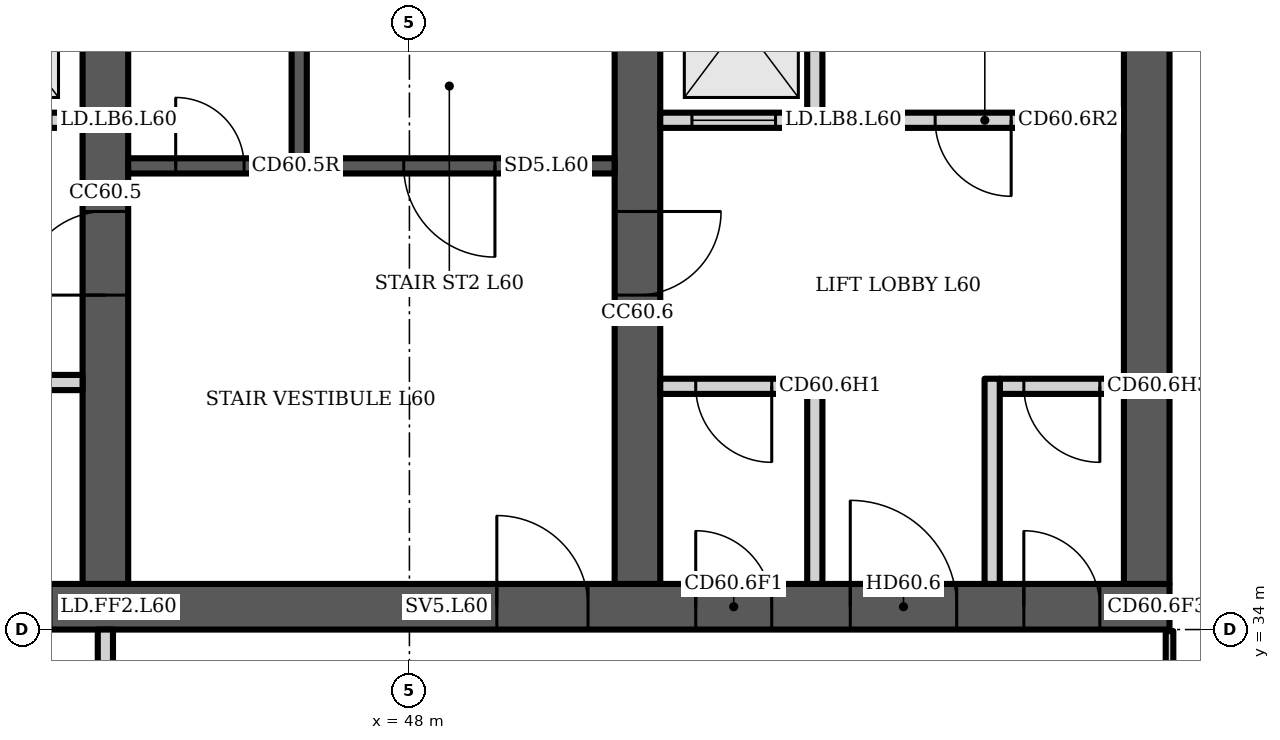
"""IFC4 building model, lengths in metres.
Left out: names, types, materials, properties, quantities, classifications, styles, units other than length and angle.
Written with IfcOpenShell. Run it as: python <this file> out.ifc"""

import sys

from ifc_helpers import new_model, si_unit, direction, frame, frame_2d, origin, place, context, subcontext, project, spatial, polyline, rectangle, outline, extrude, element, fill, save


model = new_model("IFC4")
c1 = context("Model", 3, precision=1e-05, world=origin(), true_north=direction((0.0, 1.0)))
c2 = subcontext(c1, "Body", "Model", "MODEL_VIEW")
j1 = project(units=[si_unit("LENGTHUNIT", "METRE"), si_unit("PLANEANGLEUNIT", "RADIAN")], contexts=[c1])
p1 = place(None, origin())
s1 = spatial("IfcSite", under=j1, at=p1, CompositionType="ELEMENT")
p2 = place(p1, origin())
s2 = spatial("IfcBuilding", under=s1, at=p2, CompositionType="ELEMENT")
p3 = place(p2, frame((0.0, 0.0, 239.5)))
s3 = spatial("IfcBuildingStorey", under=s2, at=p3, CompositionType="ELEMENT", Elevation=239.5)
p4 = place(p3, frame((23.0, 34.3, 0.0), z_axis=(0.0, 0.0, 1.0), x_axis=(1.0, 0.0, 0.0)))
e1 = element("IfcWall", 1, at=p4, inside=s3, PredefinedType="SHEAR", context=c2, shape_type="SweptSolid", body=[
    extrude(rectangle(XDim=35.0, YDim=0.6, at=frame_2d((17.5, 0.0))), origin(), (0.0, 0.0, 1.0), 3.6),
])
p5 = place(p4, frame((0.65, 0.0, 0.0)))
e2 = element("IfcOpeningElement", 2, at=p5, cuts=e1, PredefinedType="OPENING", context=c2, shape_type="SweptSolid", body=[
    extrude(rectangle(XDim=1.2, YDim=2.1, at=frame_2d((0.6, 1.05))), frame((0.0, 0.31, 0.0), z_axis=(0.0, -1.0, 0.0), x_axis=(1.0, 0.0, 0.0)), (0.0, 0.0, 1.0), 0.62),
])
p6 = place(p4, frame((7.717, 0.0, 0.0)))
e3 = element("IfcOpeningElement", 3, at=p6, cuts=e1, PredefinedType="OPENING", context=c2, shape_type="SweptSolid", body=[
    extrude(rectangle(XDim=1.1, YDim=2.1, at=frame_2d((0.55, 1.05))), frame((0.0, 0.31, 0.0), z_axis=(0.0, -1.0, 0.0), x_axis=(1.0, 0.0, 0.0)), (0.0, 0.0, 1.0), 0.62),
])
p7 = place(p4, frame((12.183, 0.0, 0.0)))
e4 = element("IfcOpeningElement", 4, at=p7, cuts=e1, PredefinedType="OPENING", context=c2, shape_type="SweptSolid", body=[
    extrude(rectangle(XDim=1.1, YDim=2.1, at=frame_2d((0.55, 1.05))), frame((0.0, 0.31, 0.0), z_axis=(0.0, -1.0, 0.0), x_axis=(1.0, 0.0, 0.0)), (0.0, 0.0, 1.0), 0.62),
])
p8 = place(p4, frame((9.8, 0.0, 0.0)))
e5 = element("IfcOpeningElement", 5, at=p8, cuts=e1, PredefinedType="OPENING", context=c2, shape_type="SweptSolid", body=[
    extrude(rectangle(XDim=1.4, YDim=2.1, at=frame_2d((0.7, 1.05))), frame((0.0, 0.31, 0.0), z_axis=(0.0, -1.0, 0.0), x_axis=(1.0, 0.0, 0.0)), (0.0, 0.0, 1.0), 0.62),
])
p9 = place(p4, frame((14.717, 0.0, 0.0)))
e6 = element("IfcOpeningElement", 6, at=p9, cuts=e1, PredefinedType="OPENING", context=c2, shape_type="SweptSolid", body=[
    extrude(rectangle(XDim=1.1, YDim=2.1, at=frame_2d((0.55, 1.05))), frame((0.0, 0.31, 0.0), z_axis=(0.0, -1.0, 0.0), x_axis=(1.0, 0.0, 0.0)), (0.0, 0.0, 1.0), 0.62),
])
p10 = place(p4, frame((16.95, 0.0, 0.0)))
e7 = element("IfcOpeningElement", 7, at=p10, cuts=e1, PredefinedType="OPENING", context=c2, shape_type="SweptSolid", body=[
    extrude(rectangle(XDim=1.1, YDim=2.1, at=frame_2d((0.55, 1.05))), frame((0.0, 0.31, 0.0), z_axis=(0.0, -1.0, 0.0), x_axis=(1.0, 0.0, 0.0)), (0.0, 0.0, 1.0), 0.62),
])
p11 = place(p4, frame((19.183, 0.0, 0.0)))
e8 = element("IfcOpeningElement", 8, at=p11, cuts=e1, PredefinedType="OPENING", context=c2, shape_type="SweptSolid", body=[
    extrude(rectangle(XDim=1.1, YDim=2.1, at=frame_2d((0.55, 1.05))), frame((0.0, 0.31, 0.0), z_axis=(0.0, -1.0, 0.0), x_axis=(1.0, 0.0, 0.0)), (0.0, 0.0, 1.0), 0.62),
])
p12 = place(p4, frame((26.15, 0.0, 0.0)))
e9 = element("IfcOpeningElement", 9, at=p12, cuts=e1, PredefinedType="OPENING", context=c2, shape_type="SweptSolid", body=[
    extrude(rectangle(XDim=1.2, YDim=2.1, at=frame_2d((0.6, 1.05))), frame((0.0, 0.31, 0.0), z_axis=(0.0, -1.0, 0.0), x_axis=(1.0, 0.0, 0.0)), (0.0, 0.0, 1.0), 0.62),
])
p13 = place(p4, frame((28.767, 0.0, 0.0)))
e10 = element("IfcOpeningElement", 10, at=p13, cuts=e1, PredefinedType="OPENING", context=c2, shape_type="SweptSolid", body=[
    extrude(rectangle(XDim=1.0, YDim=2.1, at=frame_2d((0.5, 1.05))), frame((0.0, 0.31, 0.0), z_axis=(0.0, -1.0, 0.0), x_axis=(1.0, 0.0, 0.0)), (0.0, 0.0, 1.0), 0.62),
])
p14 = place(p4, frame((33.083, 0.0, 0.0)))
e11 = element("IfcOpeningElement", 11, at=p14, cuts=e1, PredefinedType="OPENING", context=c2, shape_type="SweptSolid", body=[
    extrude(rectangle(XDim=1.0, YDim=2.1, at=frame_2d((0.5, 1.05))), frame((0.0, 0.31, 0.0), z_axis=(0.0, -1.0, 0.0), x_axis=(1.0, 0.0, 0.0)), (0.0, 0.0, 1.0), 0.62),
])
p15 = place(p4, frame((30.8, 0.0, 0.0)))
e12 = element("IfcOpeningElement", 12, at=p15, cuts=e1, PredefinedType="OPENING", context=c2, shape_type="SweptSolid", body=[
    extrude(rectangle(XDim=1.4, YDim=2.1, at=frame_2d((0.7, 1.05))), frame((0.0, 0.31, 0.0), z_axis=(0.0, -1.0, 0.0), x_axis=(1.0, 0.0, 0.0)), (0.0, 0.0, 1.0), 0.62),
])
p16 = place(p3, frame((44.0, 34.6, 0.0), z_axis=(0.0, 0.0, 1.0), x_axis=(0.0, 1.0, 0.0)))
e13 = element("IfcWall", 13, at=p16, inside=s3, PredefinedType="SHEAR", context=c2, shape_type="SweptSolid", body=[
    extrude(rectangle(XDim=14.784, YDim=0.6, at=frame_2d((7.392, 0.0))), origin(), (0.0, 0.0, 1.0), 3.6),
])
p17 = place(p16, frame((11.608, 0.0, 0.0)))
e14 = element("IfcOpeningElement", 14, at=p17, cuts=e13, PredefinedType="OPENING", context=c2, shape_type="SweptSolid", body=[
    extrude(rectangle(XDim=1.0, YDim=2.1, at=frame_2d((0.5, 1.05))), frame((0.0, 0.31, 0.0), z_axis=(0.0, -1.0, 0.0), x_axis=(1.0, 0.0, 0.0)), (0.0, 0.0, 1.0), 0.62),
])
p18 = place(p16, frame((3.8, 0.0, 0.0)))
e15 = element("IfcOpeningElement", 15, at=p18, cuts=e13, PredefinedType="OPENING", context=c2, shape_type="SweptSolid", body=[
    extrude(rectangle(XDim=1.1, YDim=2.1, at=frame_2d((0.55, 1.05))), frame((0.0, 0.31, 0.0), z_axis=(0.0, -1.0, 0.0), x_axis=(1.0, 0.0, 0.0)), (0.0, 0.0, 1.0), 0.62),
])
p19 = place(p3, frame((51.0, 34.6, 0.0), z_axis=(0.0, 0.0, 1.0), x_axis=(0.0, 1.0, 0.0)))
e16 = element("IfcWall", 16, at=p19, inside=s3, PredefinedType="SHEAR", context=c2, shape_type="SweptSolid", body=[
    extrude(rectangle(XDim=14.171, YDim=0.6, at=frame_2d((7.085, 0.0))), origin(), (0.0, 0.0, 1.0), 3.6),
])
p20 = place(p19, frame((3.8, 0.0, 0.0)))
e17 = element("IfcOpeningElement", 17, at=p20, cuts=e16, PredefinedType="OPENING", context=c2, shape_type="SweptSolid", body=[
    extrude(rectangle(XDim=1.1, YDim=2.1, at=frame_2d((0.55, 1.05))), frame((0.0, 0.31, 0.0), z_axis=(0.0, -1.0, 0.0), x_axis=(1.0, 0.0, 0.0)), (0.0, 0.0, 1.0), 0.62),
])
p21 = place(p3, frame((57.7, 34.6, 0.0), z_axis=(0.0, 0.0, 1.0), x_axis=(0.0, 1.0, 0.0)))
e18 = element("IfcWall", 18, at=p21, inside=s3, PredefinedType="SHEAR", context=c2, shape_type="SweptSolid", body=[
    extrude(rectangle(XDim=13.585, YDim=0.6, at=frame_2d((6.792, 0.0))), origin(), (0.0, 0.0, 1.0), 3.6),
])
p22 = place(p3, frame((37.3, 40.7, 0.0), z_axis=(0.0, 0.0, 1.0), x_axis=(1.0, 0.0, 0.0)))
e19 = element("IfcWall", 19, at=p22, inside=s3, PredefinedType="PARTITIONING", context=c2, shape_type="SweptSolid", body=[
    extrude(rectangle(XDim=6.4, YDim=0.2, at=frame_2d((3.2, 0.0))), origin(), (0.0, 0.0, 1.0), 3.2),
])
p23 = place(p22, frame((0.417, 0.0, 0.0)))
e20 = element("IfcOpeningElement", 20, at=p23, cuts=e19, PredefinedType="OPENING", context=c2, shape_type="SweptSolid", body=[
    extrude(rectangle(XDim=1.1, YDim=2.1, at=frame_2d((0.55, 1.05))), frame((0.0, 0.11, 0.0), z_axis=(0.0, -1.0, 0.0), x_axis=(1.0, 0.0, 0.0)), (0.0, 0.0, 1.0), 0.22),
])
p24 = place(p22, frame((2.65, 0.0, 0.0)))
e21 = element("IfcOpeningElement", 21, at=p24, cuts=e19, PredefinedType="OPENING", context=c2, shape_type="SweptSolid", body=[
    extrude(rectangle(XDim=1.1, YDim=2.1, at=frame_2d((0.55, 1.05))), frame((0.0, 0.11, 0.0), z_axis=(0.0, -1.0, 0.0), x_axis=(1.0, 0.0, 0.0)), (0.0, 0.0, 1.0), 0.22),
])
p25 = place(p22, frame((4.883, 0.0, 0.0)))
e22 = element("IfcOpeningElement", 22, at=p25, cuts=e19, PredefinedType="OPENING", context=c2, shape_type="SweptSolid", body=[
    extrude(rectangle(XDim=1.1, YDim=2.1, at=frame_2d((0.55, 1.05))), frame((0.0, 0.11, 0.0), z_axis=(0.0, -1.0, 0.0), x_axis=(1.0, 0.0, 0.0)), (0.0, 0.0, 1.0), 0.22),
])
p26 = place(p3, frame((0.0, 0.0, -0.0)))
e23 = element("IfcWall", 23, at=p26, inside=s3, PredefinedType="PARTITIONING", context=c2, shape_type="SweptSolid", body=[
    extrude(outline(polyline([(41.567, 37.1), (39.433, 37.1), (39.433, 34.6), (39.233, 34.6), (39.233, 37.45), (37.3, 37.45), (37.3, 37.65), (39.233, 37.65), (39.433, 37.65), (39.433, 37.3), (41.567, 37.3), (41.567, 37.35), (41.767, 37.35), (43.7, 37.35), (43.7, 37.15), (41.767, 37.15), (41.767, 34.6), (41.567, 34.6), (41.567, 37.1)])), origin(), (0.0, 0.0, 1.0), 3.2),
])
p27 = place(p3, frame((0.0, 0.0, -0.0)))
e24 = element("IfcWall", 24, at=p27, inside=s3, PredefinedType="PARTITIONING", context=c2, shape_type="SweptSolid", body=[
    extrude(outline(polyline([(39.433, 40.8), (39.233, 40.8), (39.233, 43.8), (37.3, 43.8), (37.3, 44.0), (43.7, 44.0), (43.7, 43.8), (41.767, 43.8), (41.767, 40.8), (41.567, 40.8), (41.567, 43.8), (39.433, 43.8), (39.433, 40.8)])), origin(), (0.0, 0.0, 1.0), 3.2),
])
p28 = place(p3, frame((44.3, 40.1, 0.0), z_axis=(0.0, 0.0, 1.0), x_axis=(1.0, 0.0, 0.0)))
e25 = element("IfcWall", 25, at=p28, inside=s3, PredefinedType="SHEAR", context=c2, shape_type="SweptSolid", body=[
    extrude(rectangle(XDim=6.4, YDim=0.2, at=frame_2d((3.2, 0.0))), origin(), (0.0, 0.0, 1.0), 3.2),
])
p29 = place(p28, frame((3.625, 0.0, 0.0)))
e26 = element("IfcOpeningElement", 26, at=p29, cuts=e25, PredefinedType="OPENING", context=c2, shape_type="SweptSolid", body=[
    extrude(rectangle(XDim=1.2, YDim=2.1, at=frame_2d((0.6, 1.05))), frame((0.0, 0.11, 0.0), z_axis=(0.0, -1.0, 0.0), x_axis=(1.0, 0.0, 0.0)), (0.0, 0.0, 1.0), 0.22),
])
p30 = place(p28, frame((0.625, 0.0, 0.0)))
e27 = element("IfcOpeningElement", 27, at=p30, cuts=e25, PredefinedType="OPENING", context=c2, shape_type="SweptSolid", body=[
    extrude(rectangle(XDim=0.9, YDim=2.1, at=frame_2d((0.45, 1.05))), frame((0.0, 0.11, 0.0), z_axis=(0.0, -1.0, 0.0), x_axis=(1.0, 0.0, 0.0)), (0.0, 0.0, 1.0), 0.22),
])
p31 = place(p3, frame((46.55, 40.2, 0.0), z_axis=(0.0, 0.0, 1.0), x_axis=(0.0, 1.0, 0.0)))
e28 = element("IfcWall", 28, at=p31, inside=s3, PredefinedType="SHEAR", context=c2, shape_type="SweptSolid", body=[
    extrude(rectangle(XDim=7.2, YDim=0.2, at=frame_2d((3.6, 0.0))), origin(), (0.0, 0.0, 1.0), 3.2),
])
p32 = place(p3, frame((51.3, 37.2, 0.0), z_axis=(0.0, 0.0, 1.0), x_axis=(1.0, 0.0, 0.0)))
e29 = element("IfcWall", 29, at=p32, inside=s3, PredefinedType="PARTITIONING", context=c2, shape_type="SweptSolid", body=[
    extrude(rectangle(XDim=1.933, YDim=0.2, at=frame_2d((0.967, 0.0))), origin(), (0.0, 0.0, 1.0), 3.2),
])
p33 = place(p32, frame((0.467, 0.0, 0.0)))
e30 = element("IfcOpeningElement", 30, at=p33, cuts=e29, PredefinedType="OPENING", context=c2, shape_type="SweptSolid", body=[
    extrude(rectangle(XDim=1.0, YDim=2.1, at=frame_2d((0.5, 1.05))), frame((0.0, 0.11, 0.0), z_axis=(0.0, -1.0, 0.0), x_axis=(1.0, 0.0, 0.0)), (0.0, 0.0, 1.0), 0.22),
])
p34 = place(p3, frame((55.767, 37.2, 0.0), z_axis=(0.0, 0.0, 1.0), x_axis=(1.0, 0.0, 0.0)))
e31 = element("IfcWall", 31, at=p34, inside=s3, PredefinedType="PARTITIONING", context=c2, shape_type="SweptSolid", body=[
    extrude(rectangle(XDim=1.633, YDim=0.2, at=frame_2d((0.817, 0.0))), origin(), (0.0, 0.0, 1.0), 3.2),
])
p35 = place(p34, frame((0.317, 0.0, 0.0)))
e32 = element("IfcOpeningElement", 32, at=p35, cuts=e31, PredefinedType="OPENING", context=c2, shape_type="SweptSolid", body=[
    extrude(rectangle(XDim=1.0, YDim=2.1, at=frame_2d((0.5, 1.05))), frame((0.0, 0.11, 0.0), z_axis=(0.0, -1.0, 0.0), x_axis=(1.0, 0.0, 0.0)), (0.0, 0.0, 1.0), 0.22),
])
p36 = place(p3, frame((51.3, 40.7, 0.0), z_axis=(0.0, 0.0, 1.0), x_axis=(1.0, 0.0, 0.0)))
e33 = element("IfcWall", 33, at=p36, inside=s3, PredefinedType="PARTITIONING", context=c2, shape_type="SweptSolid", body=[
    extrude(rectangle(XDim=6.1, YDim=0.2, at=frame_2d((3.05, 0.0))), origin(), (0.0, 0.0, 1.0), 3.2),
])
p37 = place(p36, frame((0.417, 0.0, 0.0)))
e34 = element("IfcOpeningElement", 34, at=p37, cuts=e33, PredefinedType="OPENING", context=c2, shape_type="SweptSolid", body=[
    extrude(rectangle(XDim=1.1, YDim=2.1, at=frame_2d((0.55, 1.05))), frame((0.0, 0.11, 0.0), z_axis=(0.0, -1.0, 0.0), x_axis=(1.0, 0.0, 0.0)), (0.0, 0.0, 1.0), 0.22),
])
p38 = place(p36, frame((3.617, 0.0, 0.0)))
e35 = element("IfcOpeningElement", 35, at=p38, cuts=e33, PredefinedType="OPENING", context=c2, shape_type="SweptSolid", body=[
    extrude(rectangle(XDim=1.0, YDim=2.1, at=frame_2d((0.5, 1.05))), frame((0.0, 0.11, 0.0), z_axis=(0.0, -1.0, 0.0), x_axis=(1.0, 0.0, 0.0)), (0.0, 0.0, 1.0), 0.22),
])
p39 = place(p3, frame((0.0, 0.0, -0.0)))
e36 = element("IfcWall", 36, at=p39, inside=s3, PredefinedType="PARTITIONING", context=c2, shape_type="SweptSolid", body=[
    extrude(outline(polyline([(53.233, 34.6), (53.233, 37.3), (53.433, 37.3), (53.433, 34.6), (53.233, 34.6)])), origin(), (0.0, 0.0, 1.0), 3.2),
])
p40 = place(p3, frame((0.0, 0.0, -0.0)))
e37 = element("IfcWall", 37, at=p40, inside=s3, PredefinedType="PARTITIONING", context=c2, shape_type="SweptSolid", body=[
    extrude(outline(polyline([(55.567, 34.6), (55.567, 37.3), (55.767, 37.3), (55.767, 34.6), (55.567, 34.6)])), origin(), (0.0, 0.0, 1.0), 3.2),
])
p41 = place(p3, frame((0.0, 0.0, -0.0)))
e38 = element("IfcWall", 38, at=p41, inside=s3, PredefinedType="PARTITIONING", context=c2, shape_type="SweptSolid", body=[
    extrude(outline(polyline([(53.433, 40.8), (53.433, 43.8), (53.233, 43.8), (53.233, 40.8), (53.433, 40.8)])), origin(), (0.0, 0.0, 1.0), 3.2),
])
p42 = place(p3, frame((44.0, 30.5, 0.0), z_axis=(0.0, 0.0, 1.0), x_axis=(0.0, 1.0, 0.0)))
e39 = element("IfcWall", 39, at=p42, inside=s3, PredefinedType="PARTITIONING", context=c2, shape_type="SweptSolid", body=[
    extrude(rectangle(XDim=3.5, YDim=0.2, at=frame_2d((1.75, 0.0))), origin(), (0.0, 0.0, 1.0), 3.2),
])
p43 = place(p42, frame((1.2, 0.0, 0.0)))
e40 = element("IfcOpeningElement", 40, at=p43, cuts=e39, PredefinedType="OPENING", context=c2, shape_type="SweptSolid", body=[
    extrude(rectangle(XDim=1.1, YDim=2.1, at=frame_2d((0.55, 1.05))), frame((0.0, 0.11, 0.0), z_axis=(0.0, -1.0, 0.0), x_axis=(1.0, 0.0, 0.0)), (0.0, 0.0, 1.0), 0.22),
])
p44 = place(p3, frame((58.0, 31.925, 0.0), z_axis=(0.0, 0.0, 1.0), x_axis=(0.0, 1.0, 0.0)))
e41 = element("IfcWall", 41, at=p44, inside=s3, PredefinedType="PARTITIONING", context=c2, shape_type="SweptSolid", body=[
    extrude(rectangle(XDim=2.055, YDim=0.1, at=frame_2d((1.027, 0.0))), origin(), (0.0, 0.0, 1.0), 3.2),
])
p45 = place(p29, origin())
e42 = element("IfcDoor", 42, at=p45, inside=s3, OperationType="SINGLE_SWING_RIGHT", PredefinedType="DOOR", context=c2, shape_type="SweptSolid", body=[
    extrude(rectangle(XDim=1.2, YDim=2.1, at=frame_2d((0.6, 1.05))), frame((0.0, 0.025, 0.0), z_axis=(0.0, -1.0, 0.0), x_axis=(1.0, 0.0, 0.0)), (0.0, 0.0, 1.0), 0.05),
])
fill(e26, e42)
p46 = place(p30, origin())
e43 = element("IfcDoor", 43, at=p46, inside=s3, OperationType="SINGLE_SWING_LEFT", PredefinedType="DOOR", context=c2, shape_type="SweptSolid", body=[
    extrude(rectangle(XDim=0.9, YDim=2.1, at=frame_2d((0.45, 1.05))), frame((0.0, 0.025, 0.0), z_axis=(0.0, -1.0, 0.0), x_axis=(1.0, 0.0, 0.0)), (0.0, 0.0, 1.0), 0.05),
])
fill(e27, e43)
p47 = place(p12, origin())
e44 = element("IfcDoor", 44, at=p47, inside=s3, OperationType="SINGLE_SWING_LEFT", PredefinedType="DOOR", context=c2, shape_type="SweptSolid", body=[
    extrude(rectangle(XDim=1.2, YDim=2.1, at=frame_2d((0.6, 1.05))), frame((0.0, 0.025, 0.0), z_axis=(0.0, -1.0, 0.0), x_axis=(1.0, 0.0, 0.0)), (0.0, 0.0, 1.0), 0.05),
])
fill(e9, e44)
p48 = place(p13, origin())
e45 = element("IfcDoor", 45, at=p48, inside=s3, OperationType="SINGLE_SWING_LEFT", PredefinedType="DOOR", context=c2, shape_type="SweptSolid", body=[
    extrude(rectangle(XDim=1.0, YDim=2.1, at=frame_2d((0.5, 1.05))), frame((0.0, 0.025, 0.0), z_axis=(0.0, -1.0, 0.0), x_axis=(1.0, 0.0, 0.0)), (0.0, 0.0, 1.0), 0.05),
])
fill(e10, e45)
p49 = place(p33, origin())
e46 = element("IfcDoor", 46, at=p49, inside=s3, OperationType="SINGLE_SWING_RIGHT", PredefinedType="DOOR", context=c2, shape_type="SweptSolid", body=[
    extrude(rectangle(XDim=1.0, YDim=2.1, at=frame_2d((0.5, 1.05))), frame((0.0, 0.025, 0.0), z_axis=(0.0, -1.0, 0.0), x_axis=(1.0, 0.0, 0.0)), (0.0, 0.0, 1.0), 0.05),
])
fill(e30, e46)
p50 = place(p14, origin())
e47 = element("IfcDoor", 47, at=p50, inside=s3, OperationType="SINGLE_SWING_LEFT", PredefinedType="DOOR", context=c2, shape_type="SweptSolid", body=[
    extrude(rectangle(XDim=1.0, YDim=2.1, at=frame_2d((0.5, 1.05))), frame((0.0, 0.025, 0.0), z_axis=(0.0, -1.0, 0.0), x_axis=(1.0, 0.0, 0.0)), (0.0, 0.0, 1.0), 0.05),
])
fill(e11, e47)
p51 = place(p35, origin())
e48 = element("IfcDoor", 48, at=p51, inside=s3, OperationType="SINGLE_SWING_RIGHT", PredefinedType="DOOR", context=c2, shape_type="SweptSolid", body=[
    extrude(rectangle(XDim=1.0, YDim=2.1, at=frame_2d((0.5, 1.05))), frame((0.0, 0.025, 0.0), z_axis=(0.0, -1.0, 0.0), x_axis=(1.0, 0.0, 0.0)), (0.0, 0.0, 1.0), 0.05),
])
fill(e32, e48)
p52 = place(p15, origin())
e49 = element("IfcDoor", 49, at=p52, inside=s3, OperationType="DOUBLE_DOOR_SINGLE_SWING", PredefinedType="DOOR", context=c2, shape_type="SweptSolid", body=[
    extrude(rectangle(XDim=1.4, YDim=2.1, at=frame_2d((0.7, 1.05))), frame((0.0, 0.025, 0.0), z_axis=(0.0, -1.0, 0.0), x_axis=(1.0, 0.0, 0.0)), (0.0, 0.0, 1.0), 0.05),
])
fill(e12, e49)
p53 = place(p37, origin())
e50 = element("IfcDoor", 50, at=p53, inside=s3, OperationType="DOUBLE_DOOR_SLIDING", PredefinedType="DOOR", context=c2, shape_type="SweptSolid", body=[
    extrude(rectangle(XDim=1.1, YDim=2.1, at=frame_2d((0.55, 1.05))), frame((0.0, 0.025, 0.0), z_axis=(0.0, -1.0, 0.0), x_axis=(1.0, 0.0, 0.0)), (0.0, 0.0, 1.0), 0.05),
])
fill(e34, e50)
p54 = place(p38, origin())
e51 = element("IfcDoor", 51, at=p54, inside=s3, OperationType="SINGLE_SWING_RIGHT", PredefinedType="DOOR", context=c2, shape_type="SweptSolid", body=[
    extrude(rectangle(XDim=1.0, YDim=2.1, at=frame_2d((0.5, 1.05))), frame((0.0, 0.025, 0.0), z_axis=(0.0, -1.0, 0.0), x_axis=(1.0, 0.0, 0.0)), (0.0, 0.0, 1.0), 0.05),
])
fill(e35, e51)
p55 = place(p18, origin())
e52 = element("IfcDoor", 52, at=p55, inside=s3, OperationType="SINGLE_SWING_LEFT", PredefinedType="DOOR", context=c2, shape_type="SweptSolid", body=[
    extrude(rectangle(XDim=1.1, YDim=2.1, at=frame_2d((0.55, 1.05))), frame((0.0, 0.025, 0.0), z_axis=(0.0, -1.0, 0.0), x_axis=(1.0, 0.0, 0.0)), (0.0, 0.0, 1.0), 0.05),
])
fill(e15, e52)
p56 = place(p20, origin())
e53 = element("IfcDoor", 53, at=p56, inside=s3, OperationType="SINGLE_SWING_RIGHT", PredefinedType="DOOR", context=c2, shape_type="SweptSolid", body=[
    extrude(rectangle(XDim=1.1, YDim=2.1, at=frame_2d((0.55, 1.05))), frame((0.0, 0.025, 0.0), z_axis=(0.0, -1.0, 0.0), x_axis=(1.0, 0.0, 0.0)), (0.0, 0.0, 1.0), 0.05),
])
fill(e17, e53)
save(model, sys.argv[1])
